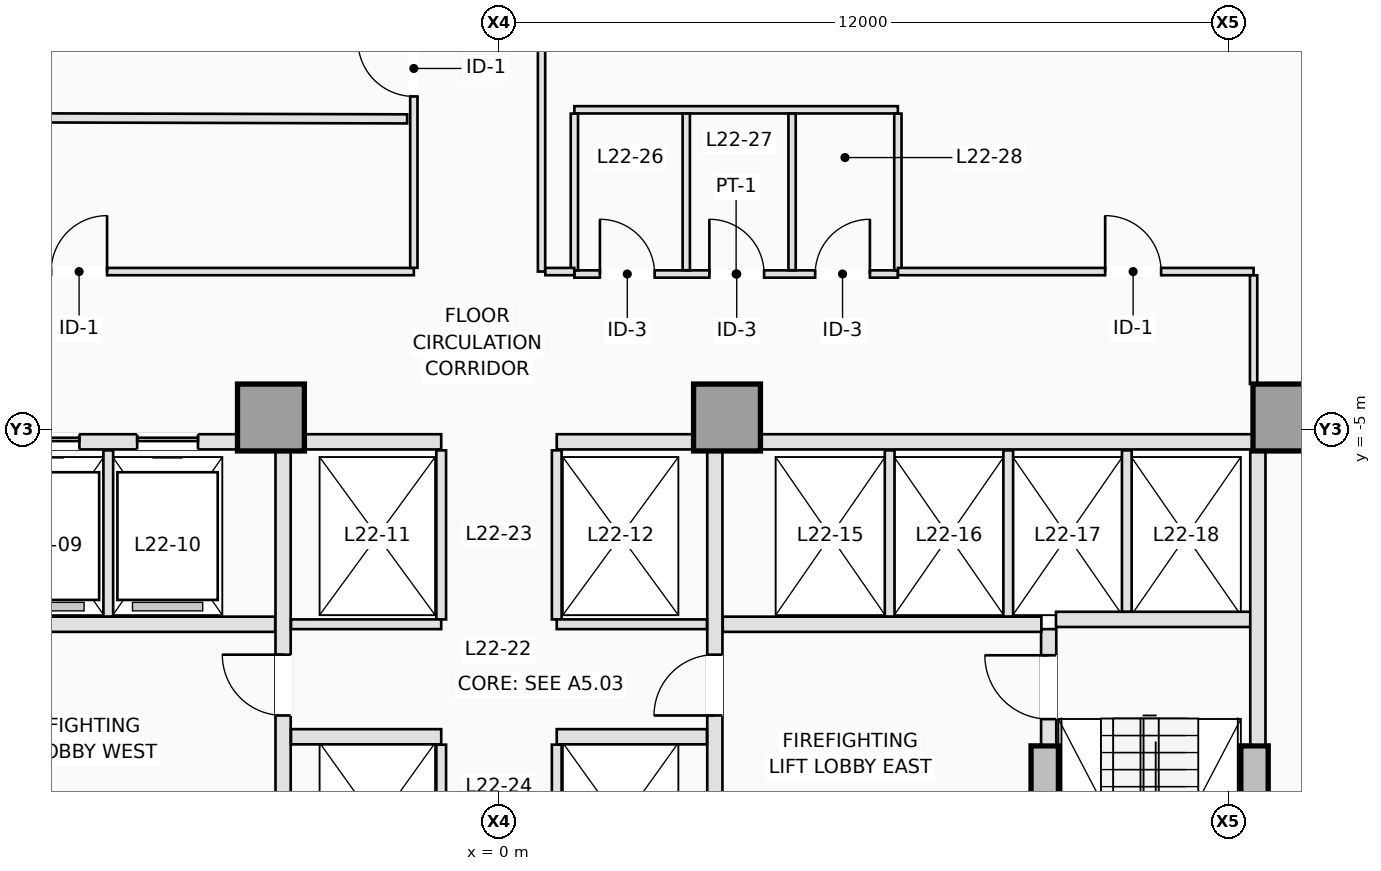
"""IFC4 building model, lengths in metres.
Left out: names, types, materials, properties, quantities, classifications, styles, units other than length and angle.
Written with IfcOpenShell. Run it as: python <this file> out.ifc"""

import sys

from ifc_helpers import new_model, si_unit, direction, frame, frame_2d, origin, origin_2d, place, context, subcontext, project, spatial, rectangle, extrude, element, fill, save


model = new_model("IFC4")
c1 = context("Model", 3, precision=1e-05, world=origin(), true_north=direction((0.0, 1.0)))
c2 = subcontext(c1, "Body", "Model", "MODEL_VIEW")
j1 = project(units=[si_unit("LENGTHUNIT", "METRE"), si_unit("PLANEANGLEUNIT", "RADIAN")], contexts=[c1])
p1 = place(None, origin())
s1 = spatial("IfcSite", under=j1, at=p1, CompositionType="ELEMENT")
p2 = place(p1, origin())
s2 = spatial("IfcBuilding", under=s1, at=p2, CompositionType="ELEMENT")
p3 = place(p2, frame((0.0, 0.0, 83.6)))
s3 = spatial("IfcBuildingStorey", under=s2, at=p3, CompositionType="ELEMENT", Elevation=83.6)
p4 = place(p3, frame((12.425, -15.725, 0.0), z_axis=(0.0, 0.0, 1.0), x_axis=(0.0, 1.0, 0.0)))
e1 = element("IfcWall", 1, at=p4, inside=s3, PredefinedType="SHEAR", context=c2, shape_type="SweptSolid", body=[
    extrude(rectangle(XDim=5.525, YDim=0.45, at=frame_2d((2.763, 0.0))), origin(), (0.0, 0.0, 1.0), 3.5),
])
p5 = place(p3, frame((8.975, -16.15, 0.0), z_axis=(0.0, 0.0, 1.0), x_axis=(0.0, 1.0, 0.0)))
e2 = element("IfcWall", 2, at=p5, inside=s3, PredefinedType="SHEAR", context=c2, shape_type="SweptSolid", body=[
    extrude(rectangle(XDim=5.95, YDim=0.45, at=frame_2d((2.975, 0.0))), origin(), (0.0, 0.0, 1.0), 3.5),
])
for number, where, z_axis, x_axis in (
    (3, (-3.75, -4.8, 0.0), (0.0, 0.0, 1.0), (1.0, 0.0, 0.0)),
    (4, (3.75, -4.8, 0.0), (0.0, 0.0, 1.0), (1.0, 0.0, 0.0)),
    (5, (12.95, -4.8, 0.0), (0.0, 0.0, 1.0), (1.0, 0.0, 0.0)),
):
    element("IfcColumn", number, at=place(p3, frame(where, z_axis=z_axis, x_axis=x_axis)), inside=s3, PredefinedType="COLUMN", context=c2, shape_type="SweptSolid", body=[
        extrude(rectangle(XDim=1.1, YDim=1.1, at=origin_2d()), origin(), (0.0, 0.0, 1.0), 3.5),
    ])
p6 = place(p3, frame((9.04, -10.18, 0.0), z_axis=(0.0, 0.0, 1.0), x_axis=(0.0, 1.0, 0.0)))
e6 = element("IfcWall", 6, at=p6, inside=s3, PredefinedType="PARTITIONING", context=c2, shape_type="SweptSolid", body=[
    extrude(rectangle(XDim=1.9, YDim=0.25, at=frame_2d((0.95, 0.0))), origin(), (0.0, 0.0, 1.0), 3.25),
])
p7 = place(p6, frame((0.42, 0.0, 0.0)))
e7 = element("IfcOpeningElement", 7, at=p7, cuts=e6, PredefinedType="OPENING", context=c2, shape_type="SweptSolid", body=[
    extrude(rectangle(XDim=1.05, YDim=2.15, at=frame_2d((0.525, 1.075))), frame((0.0, 0.135, 0.0), z_axis=(0.0, -1.0, 0.0), x_axis=(1.0, 0.0, 0.0)), (0.0, 0.0, 1.0), 0.27),
])
p8 = place(p3, frame((9.16, -8.12, 0.0), z_axis=(0.0, 0.0, 1.0), x_axis=(1.0, 0.0, 0.0)))
e8 = element("IfcWall", 8, at=p8, inside=s3, PredefinedType="PARTITIONING", context=c2, shape_type="SweptSolid", body=[
    extrude(rectangle(XDim=3.22, YDim=0.25, at=frame_2d((1.61, 0.0))), origin(), (0.0, 0.0, 1.0), 3.25),
])
p9 = place(p3, frame((12.48, -10.18, 0.0), z_axis=(0.0, 0.0, 1.0), x_axis=(0.0, 1.0, 0.0)))
e9 = element("IfcWall", 9, at=p9, inside=s3, PredefinedType="PARTITIONING", context=c2, shape_type="SweptSolid", body=[
    extrude(rectangle(XDim=4.828, YDim=0.25, at=frame_2d((2.414, 0.0))), origin(), (0.0, 0.0, 1.0), 3.25),
])
for number, where, z_axis, x_axis in (
    (10, (-8.92, -8.2, 0.0), (0.0, 0.0, 1.0), (1.0, 0.0, 0.0)),
    (11, (3.68, -8.2, 0.0), (0.0, 0.0, 1.0), (1.0, 0.0, 0.0)),
):
    element("IfcWall", number, at=place(p3, frame(where, z_axis=z_axis, x_axis=x_axis)), inside=s3, PredefinedType="PARTITIONING", context=c2, shape_type="SweptSolid", body=[
        extrude(rectangle(XDim=5.24, YDim=0.25, at=frame_2d((2.62, 0.0))), origin(), (0.0, 0.0, 1.0), 3.25),
    ])
p10 = place(p3, frame((-3.55, -15.798, 0.0), z_axis=(0.0, 0.0, 1.0), x_axis=(0.0, 1.0, 0.0)))
e12 = element("IfcWall", 12, at=p10, inside=s3, PredefinedType="PARTITIONING", context=c2, shape_type="SweptSolid", body=[
    extrude(rectangle(XDim=10.446, YDim=0.25, at=frame_2d((5.223, 0.0))), origin(), (0.0, 0.0, 1.0), 3.25),
])
p11 = place(p10, frame((6.098, 0.0, 0.0)))
e13 = element("IfcOpeningElement", 13, at=p11, cuts=e12, PredefinedType="OPENING", context=c2, shape_type="SweptSolid", body=[
    extrude(rectangle(XDim=1.0, YDim=2.15, at=frame_2d((0.5, 1.075))), frame((0.0, 0.135, 0.0), z_axis=(0.0, -1.0, 0.0), x_axis=(1.0, 0.0, 0.0)), (0.0, 0.0, 1.0), 0.27),
])
p12 = place(p3, frame((3.55, -15.798, 0.0), z_axis=(0.0, 0.0, 1.0), x_axis=(0.0, 1.0, 0.0)))
e14 = element("IfcWall", 14, at=p12, inside=s3, PredefinedType="PARTITIONING", context=c2, shape_type="SweptSolid", body=[
    extrude(rectangle(XDim=10.446, YDim=0.25, at=frame_2d((5.223, 0.0))), origin(), (0.0, 0.0, 1.0), 3.25),
])
p13 = place(p12, frame((6.098, 0.0, 0.0)))
e15 = element("IfcOpeningElement", 15, at=p13, cuts=e14, PredefinedType="OPENING", context=c2, shape_type="SweptSolid", body=[
    extrude(rectangle(XDim=1.0, YDim=2.15, at=frame_2d((0.5, 1.075))), frame((0.0, 0.135, 0.0), z_axis=(0.0, -1.0, 0.0), x_axis=(1.0, 0.0, 0.0)), (0.0, 0.0, 1.0), 0.27),
])
p14 = place(p3, frame((-12.398, -5.2, 0.0), z_axis=(0.0, 0.0, 1.0), x_axis=(1.0, 0.0, 0.0)))
e16 = element("IfcWall", 16, at=p14, inside=s3, PredefinedType="PARTITIONING", context=c2, shape_type="SweptSolid", body=[
    extrude(rectangle(XDim=8.096, YDim=0.25, at=frame_2d((4.048, 0.0))), origin(), (0.0, 0.0, 1.0), 3.25),
])
p15 = place(p14, frame((0.598, 0.0, 0.0)))
e17 = element("IfcOpeningElement", 17, at=p15, cuts=e16, PredefinedType="OPENING", context=c2, shape_type="SweptSolid", body=[
    extrude(rectangle(XDim=1.0, YDim=2.15, at=frame_2d((0.5, 1.075))), frame((0.0, 0.135, 0.0), z_axis=(0.0, -1.0, 0.0), x_axis=(1.0, 0.0, 0.0)), (0.0, 0.0, 1.0), 0.27),
])
p16 = place(p14, frame((2.548, 0.0, 0.0)))
e18 = element("IfcOpeningElement", 18, at=p16, cuts=e16, PredefinedType="OPENING", context=c2, shape_type="SweptSolid", body=[
    extrude(rectangle(XDim=1.0, YDim=2.15, at=frame_2d((0.5, 1.075))), frame((0.0, 0.135, 0.0), z_axis=(0.0, -1.0, 0.0), x_axis=(1.0, 0.0, 0.0)), (0.0, 0.0, 1.0), 0.27),
])
p17 = place(p14, frame((4.498, 0.0, 0.0)))
e19 = element("IfcOpeningElement", 19, at=p17, cuts=e16, PredefinedType="OPENING", context=c2, shape_type="SweptSolid", body=[
    extrude(rectangle(XDim=1.0, YDim=2.15, at=frame_2d((0.5, 1.075))), frame((0.0, 0.135, 0.0), z_axis=(0.0, -1.0, 0.0), x_axis=(1.0, 0.0, 0.0)), (0.0, 0.0, 1.0), 0.27),
])
p18 = place(p14, frame((6.448, 0.0, 0.0)))
e20 = element("IfcOpeningElement", 20, at=p18, cuts=e16, PredefinedType="OPENING", context=c2, shape_type="SweptSolid", body=[
    extrude(rectangle(XDim=1.0, YDim=2.15, at=frame_2d((0.5, 1.075))), frame((0.0, 0.135, 0.0), z_axis=(0.0, -1.0, 0.0), x_axis=(1.0, 0.0, 0.0)), (0.0, 0.0, 1.0), 0.27),
])
p19 = place(p3, frame((4.302, -5.2, 0.0), z_axis=(0.0, 0.0, 1.0), x_axis=(1.0, 0.0, 0.0)))
e21 = element("IfcWall", 21, at=p19, inside=s3, PredefinedType="PARTITIONING", context=c2, shape_type="SweptSolid", body=[
    extrude(rectangle(XDim=8.096, YDim=0.25, at=frame_2d((4.048, 0.0))), origin(), (0.0, 0.0, 1.0), 3.25),
])
for number, where, z_axis, x_axis in (
    (22, (-3.198, -5.2, 0.0), (0.0, 0.0, 1.0), (1.0, 0.0, 0.0)),
    (23, (0.95, -5.2, 0.0), (0.0, 0.0, 1.0), (1.0, 0.0, 0.0)),
):
    element("IfcWall", number, at=place(p3, frame(where, z_axis=z_axis, x_axis=x_axis)), inside=s3, PredefinedType="PARTITIONING", context=c2, shape_type="SweptSolid", body=[
        extrude(rectangle(XDim=2.248, YDim=0.25, at=frame_2d((1.124, 0.0))), origin(), (0.0, 0.0, 1.0), 3.25),
    ])
for number, where, z_axis, x_axis in (
    (24, (-6.425, -8.073, 0.0), (0.0, 0.0, 1.0), (0.0, 1.0, 0.0)),
    (25, (6.425, -8.073, 0.0), (0.0, 0.0, 1.0), (0.0, 1.0, 0.0)),
    (26, (8.375, -8.073, 0.0), (0.0, 0.0, 1.0), (0.0, 1.0, 0.0)),
):
    element("IfcWall", number, at=place(p3, frame(where, z_axis=z_axis, x_axis=x_axis)), inside=s3, PredefinedType="PARTITIONING", context=c2, shape_type="SweptSolid", body=[
        extrude(rectangle(XDim=2.733, YDim=0.16, at=frame_2d((1.366, 0.0))), origin(), (0.0, 0.0, 1.0), 3.25),
    ])
p20 = place(p3, frame((10.325, -7.993, 0.0), z_axis=(0.0, 0.0, 1.0), x_axis=(0.0, 1.0, 0.0)))
e27 = element("IfcWall", 27, at=p20, inside=s3, PredefinedType="PARTITIONING", context=c2, shape_type="SweptSolid", body=[
    extrude(rectangle(XDim=2.653, YDim=0.16, at=frame_2d((1.326, 0.0))), origin(), (0.0, 0.0, 1.0), 3.25),
])
for number, where, z_axis, x_axis in (
    (28, (-0.95, -8.12, 0.0), (0.0, 0.0, 1.0), (0.0, 1.0, 0.0)),
    (29, (0.95, -8.12, 0.0), (0.0, 0.0, 1.0), (0.0, 1.0, 0.0)),
):
    element("IfcWall", number, at=place(p3, frame(where, z_axis=z_axis, x_axis=x_axis)), inside=s3, PredefinedType="PARTITIONING", context=c2, shape_type="SweptSolid", body=[
        extrude(rectangle(XDim=2.78, YDim=0.16, at=frame_2d((1.39, 0.0))), origin(), (0.0, 0.0, 1.0), 3.25),
    ])
for number, where, z_axis, x_axis in (
    (30, (-3.42, -8.2, 0.0), (0.0, 0.0, 1.0), (1.0, 0.0, 0.0)),
    (31, (0.95, -8.2, 0.0), (0.0, 0.0, 1.0), (1.0, 0.0, 0.0)),
):
    element("IfcWall", number, at=place(p3, frame(where, z_axis=z_axis, x_axis=x_axis)), inside=s3, PredefinedType="PARTITIONING", context=c2, shape_type="SweptSolid", body=[
        extrude(rectangle(XDim=2.47, YDim=0.16, at=frame_2d((1.235, 0.0))), origin(), (0.0, 0.0, 1.0), 3.25),
    ])
for number, where, z_axis, x_axis in (
    (32, (-3.42, -10.05, 0.0), (0.0, 0.0, 1.0), (1.0, 0.0, 0.0)),
    (33, (0.95, -10.05, 0.0), (0.0, 0.0, 1.0), (1.0, 0.0, 0.0)),
):
    element("IfcWall", number, at=place(p3, frame(where, z_axis=z_axis, x_axis=x_axis)), inside=s3, PredefinedType="PARTITIONING", context=c2, shape_type="SweptSolid", body=[
        extrude(rectangle(XDim=2.47, YDim=0.25, at=frame_2d((1.235, 0.0))), origin(), (0.0, 0.0, 1.0), 3.25),
    ])
for number, where, z_axis, x_axis in (
    (34, (-0.95, -12.818, 0.0), (0.0, 0.0, 1.0), (0.0, 1.0, 0.0)),
    (35, (0.95, -12.818, 0.0), (0.0, 0.0, 1.0), (0.0, 1.0, 0.0)),
):
    element("IfcWall", number, at=place(p3, frame(where, z_axis=z_axis, x_axis=x_axis)), inside=s3, PredefinedType="PARTITIONING", context=c2, shape_type="SweptSolid", body=[
        extrude(rectangle(XDim=2.638, YDim=0.16, at=frame_2d((1.319, 0.0))), origin(), (0.0, 0.0, 1.0), 3.25),
    ])
p21 = place(p3, frame((1.24, -2.44, 0.0), z_axis=(0.0, 0.0, 1.0), x_axis=(1.0, 0.0, 0.0)))
e36 = element("IfcWall", 36, at=p21, inside=s3, PredefinedType="PARTITIONING", context=c2, shape_type="SweptSolid", body=[
    extrude(rectangle(XDim=5.32, YDim=0.12, at=frame_2d((2.66, 0.0))), origin(), (0.0, 0.0, 1.0), 3.25),
])
p22 = place(p21, frame((0.42, 0.0, 0.0)))
e37 = element("IfcOpeningElement", 37, at=p22, cuts=e36, PredefinedType="OPENING", context=c2, shape_type="SweptSolid", body=[
    extrude(rectangle(XDim=0.9, YDim=2.12, at=frame_2d((0.45, 1.06))), frame((0.0, 0.07, 0.0), z_axis=(0.0, -1.0, 0.0), x_axis=(1.0, 0.0, 0.0)), (0.0, 0.0, 1.0), 0.14),
])
p23 = place(p21, frame((2.22, 0.0, 0.0)))
e38 = element("IfcOpeningElement", 38, at=p23, cuts=e36, PredefinedType="OPENING", context=c2, shape_type="SweptSolid", body=[
    extrude(rectangle(XDim=0.9, YDim=2.12, at=frame_2d((0.45, 1.06))), frame((0.0, 0.07, 0.0), z_axis=(0.0, -1.0, 0.0), x_axis=(1.0, 0.0, 0.0)), (0.0, 0.0, 1.0), 0.14),
])
p24 = place(p21, frame((3.96, 0.0, 0.0)))
e39 = element("IfcOpeningElement", 39, at=p24, cuts=e36, PredefinedType="OPENING", context=c2, shape_type="SweptSolid", body=[
    extrude(rectangle(XDim=0.9, YDim=2.12, at=frame_2d((0.45, 1.06))), frame((0.0, 0.07, 0.0), z_axis=(0.0, -1.0, 0.0), x_axis=(1.0, 0.0, 0.0)), (0.0, 0.0, 1.0), 0.14),
])
p25 = place(p3, frame((1.24, 0.26, 0.0), z_axis=(0.0, 0.0, 1.0), x_axis=(1.0, 0.0, 0.0)))
e40 = element("IfcWall", 40, at=p25, inside=s3, PredefinedType="PARTITIONING", context=c2, shape_type="SweptSolid", body=[
    extrude(rectangle(XDim=5.32, YDim=0.12, at=frame_2d((2.66, 0.0))), origin(), (0.0, 0.0, 1.0), 2.891),
])
for number, where, z_axis, x_axis in (
    (41, (1.24, -2.378, 0.0), (0.0, 0.0, 1.0), (0.0, 1.0, 0.0)),
    (42, (3.08, -2.378, 0.0), (0.0, 0.0, 1.0), (0.0, 1.0, 0.0)),
    (43, (4.82, -2.378, 0.0), (0.0, 0.0, 1.0), (0.0, 1.0, 0.0)),
    (44, (6.56, -2.378, 0.0), (0.0, 0.0, 1.0), (0.0, 1.0, 0.0)),
):
    element("IfcWall", number, at=place(p3, frame(where, z_axis=z_axis, x_axis=x_axis)), inside=s3, PredefinedType="PARTITIONING", context=c2, shape_type="SweptSolid", body=[
        extrude(rectangle(XDim=2.576, YDim=0.12, at=frame_2d((1.288, 0.0))), origin(), (0.0, 0.0, 1.0), 3.25),
    ])
p26 = place(p3, frame((-12.348, -2.4, 0.0), z_axis=(0.0, 0.0, 1.0), x_axis=(1.0, 0.0, 0.0)))
e45 = element("IfcWall", 45, at=p26, inside=s3, PredefinedType="PARTITIONING", context=c2, shape_type="SweptSolid", body=[
    extrude(rectangle(XDim=10.948, YDim=0.12, at=frame_2d((5.474, 0.0))), origin(), (0.0, 0.0, 1.0), 3.25),
])
p27 = place(p26, frame((4.983, 0.0, 0.0)))
e46 = element("IfcOpeningElement", 46, at=p27, cuts=e45, PredefinedType="OPENING", context=c2, shape_type="SweptSolid", body=[
    extrude(rectangle(XDim=0.92, YDim=2.12, at=frame_2d((0.46, 1.06))), frame((0.0, 0.07, 0.0), z_axis=(0.0, -1.0, 0.0), x_axis=(1.0, 0.0, 0.0)), (0.0, 0.0, 1.0), 0.14),
])
p28 = place(p3, frame((-1.4, -2.338, 0.0), z_axis=(0.0, 0.0, 1.0), x_axis=(0.0, 1.0, 0.0)))
e47 = element("IfcWall", 47, at=p28, inside=s3, PredefinedType="PARTITIONING", context=c2, shape_type="SweptSolid", body=[
    extrude(rectangle(XDim=9.238, YDim=0.12, at=frame_2d((4.619, 0.0))), origin(), (0.0, 0.0, 1.0), 3.25),
])
p29 = place(p28, frame((2.818, 0.0, 0.0)))
e48 = element("IfcOpeningElement", 48, at=p29, cuts=e47, PredefinedType="OPENING", context=c2, shape_type="SweptSolid", body=[
    extrude(rectangle(XDim=0.92, YDim=2.12, at=frame_2d((0.46, 1.06))), frame((0.0, 0.07, 0.0), z_axis=(0.0, -1.0, 0.0), x_axis=(1.0, 0.0, 0.0)), (0.0, 0.0, 1.0), 0.14),
])
p30 = place(p3, frame((0.7, 6.838, 0.0), z_axis=(0.0, 0.0, 1.0), x_axis=(0.0, -1.0, 0.0)))
e49 = element("IfcWall", 49, at=p30, inside=s3, PredefinedType="PARTITIONING", context=c2, shape_type="SweptSolid", body=[
    extrude(rectangle(XDim=9.238, YDim=0.12, at=frame_2d((4.619, 0.0))), origin(), (0.0, 0.0, 1.0), 3.25),
])
p31 = place(p30, frame((3.015, 0.0, 0.0)))
e50 = element("IfcOpeningElement", 50, at=p31, cuts=e49, PredefinedType="OPENING", context=c2, shape_type="SweptSolid", body=[
    extrude(rectangle(XDim=0.92, YDim=2.12, at=frame_2d((0.46, 1.06))), frame((0.0, 0.07, 0.0), z_axis=(0.0, -1.0, 0.0), x_axis=(1.0, 0.0, 0.0)), (0.0, 0.0, 1.0), 0.14),
])
p32 = place(p3, frame((0.762, -2.4, 0.0), z_axis=(0.0, 0.0, 1.0), x_axis=(1.0, 0.0, 0.0)))
e51 = element("IfcWall", 51, at=p32, inside=s3, PredefinedType="PARTITIONING", context=c2, shape_type="SweptSolid", body=[
    extrude(rectangle(XDim=0.476, YDim=0.12, at=frame_2d((0.238, 0.0))), origin(), (0.0, 0.0, 1.0), 3.25),
])
p33 = place(p3, frame((6.562, -2.4, 0.0), z_axis=(0.0, 0.0, 1.0), x_axis=(1.0, 0.0, 0.0)))
e52 = element("IfcWall", 52, at=p33, inside=s3, PredefinedType="PARTITIONING", context=c2, shape_type="SweptSolid", body=[
    extrude(rectangle(XDim=5.848, YDim=0.12, at=frame_2d((2.924, 0.0))), origin(), (0.0, 0.0, 1.0), 3.25),
])
p34 = place(p33, frame((3.407, 0.0, 0.0)))
e53 = element("IfcOpeningElement", 53, at=p34, cuts=e52, PredefinedType="OPENING", context=c2, shape_type="SweptSolid", body=[
    extrude(rectangle(XDim=0.92, YDim=2.12, at=frame_2d((0.46, 1.06))), frame((0.0, 0.07, 0.0), z_axis=(0.0, -1.0, 0.0), x_axis=(1.0, 0.0, 0.0)), (0.0, 0.0, 1.0), 0.14),
])
p35 = place(p3, frame((12.41, -2.462, 0.0), z_axis=(0.0, 0.0, 1.0), x_axis=(0.0, -1.0, 0.0)))
e54 = element("IfcWall", 54, at=p35, inside=s3, PredefinedType="PARTITIONING", context=c2, shape_type="SweptSolid", body=[
    extrude(rectangle(XDim=1.786, YDim=0.12, at=frame_2d((0.893, 0.0))), origin(), (0.0, 0.0, 1.0), 3.25),
])
p36 = place(p3, frame((-1.51, 0.111, 0.0), z_axis=(0.0, 0.0, 1.0), x_axis=(-0.999996640394, 0.002592142258, 0.0)))
e55 = element("IfcWall", 55, at=p36, inside=s3, PredefinedType="PARTITIONING", context=c2, shape_type="SweptSolid", body=[
    extrude(rectangle(XDim=14.128, YDim=0.15, at=frame_2d((7.064, 0.0))), origin(), (0.0, 0.0, 1.0), 2.891),
])
p37 = place(p17, origin())
e56 = element("IfcDoor", 56, at=p37, inside=s3, OperationType="SLIDING_TO_LEFT", PredefinedType="DOOR", context=c2, shape_type="SweptSolid", body=[
    extrude(rectangle(XDim=1.0, YDim=2.15, at=frame_2d((0.5, 1.075))), frame((0.0, 0.025, 0.0), z_axis=(0.0, -1.0, 0.0), x_axis=(1.0, 0.0, 0.0)), (0.0, 0.0, 1.0), 0.05),
])
fill(e19, e56)
p38 = place(p18, origin())
e57 = element("IfcDoor", 57, at=p38, inside=s3, OperationType="SLIDING_TO_LEFT", PredefinedType="DOOR", context=c2, shape_type="SweptSolid", body=[
    extrude(rectangle(XDim=1.0, YDim=2.15, at=frame_2d((0.5, 1.075))), frame((0.0, 0.025, 0.0), z_axis=(0.0, -1.0, 0.0), x_axis=(1.0, 0.0, 0.0)), (0.0, 0.0, 1.0), 0.05),
])
fill(e20, e57)
p39 = place(p7, origin())
e58 = element("IfcDoor", 58, at=p39, inside=s3, OperationType="SINGLE_SWING_RIGHT", PredefinedType="DOOR", context=c2, shape_type="SweptSolid", body=[
    extrude(rectangle(XDim=1.05, YDim=2.15, at=frame_2d((0.525, 1.075))), frame((0.0, 0.025, 0.0), z_axis=(0.0, -1.0, 0.0), x_axis=(1.0, 0.0, 0.0)), (0.0, 0.0, 1.0), 0.05),
])
fill(e7, e58)
p40 = place(p11, origin())
e59 = element("IfcDoor", 59, at=p40, inside=s3, OperationType="SINGLE_SWING_RIGHT", PredefinedType="DOOR", context=c2, shape_type="SweptSolid", body=[
    extrude(rectangle(XDim=1.0, YDim=2.15, at=frame_2d((0.5, 1.075))), frame((0.0, 0.025, 0.0), z_axis=(0.0, -1.0, 0.0), x_axis=(1.0, 0.0, 0.0)), (0.0, 0.0, 1.0), 0.05),
])
fill(e13, e59)
p41 = place(p13, origin())
e60 = element("IfcDoor", 60, at=p41, inside=s3, OperationType="SINGLE_SWING_LEFT", PredefinedType="DOOR", context=c2, shape_type="SweptSolid", body=[
    extrude(rectangle(XDim=1.0, YDim=2.15, at=frame_2d((0.5, 1.075))), frame((0.0, 0.025, 0.0), z_axis=(0.0, -1.0, 0.0), x_axis=(1.0, 0.0, 0.0)), (0.0, 0.0, 1.0), 0.05),
])
fill(e15, e60)
p42 = place(p22, origin())
e61 = element("IfcDoor", 61, at=p42, inside=s3, OperationType="SINGLE_SWING_LEFT", PredefinedType="DOOR", context=c2, shape_type="SweptSolid", body=[
    extrude(rectangle(XDim=0.9, YDim=2.12, at=frame_2d((0.45, 1.06))), frame((0.0, 0.025, 0.0), z_axis=(0.0, -1.0, 0.0), x_axis=(1.0, 0.0, 0.0)), (0.0, 0.0, 1.0), 0.05),
])
fill(e37, e61)
p43 = place(p23, origin())
e62 = element("IfcDoor", 62, at=p43, inside=s3, OperationType="SINGLE_SWING_LEFT", PredefinedType="DOOR", context=c2, shape_type="SweptSolid", body=[
    extrude(rectangle(XDim=0.9, YDim=2.12, at=frame_2d((0.45, 1.06))), frame((0.0, 0.025, 0.0), z_axis=(0.0, -1.0, 0.0), x_axis=(1.0, 0.0, 0.0)), (0.0, 0.0, 1.0), 0.05),
])
fill(e38, e62)
p44 = place(p24, origin())
e63 = element("IfcDoor", 63, at=p44, inside=s3, OperationType="SINGLE_SWING_RIGHT", PredefinedType="DOOR", context=c2, shape_type="SweptSolid", body=[
    extrude(rectangle(XDim=0.9, YDim=2.12, at=frame_2d((0.45, 1.06))), frame((0.0, 0.025, 0.0), z_axis=(0.0, -1.0, 0.0), x_axis=(1.0, 0.0, 0.0)), (0.0, 0.0, 1.0), 0.05),
])
fill(e39, e63)
p45 = place(p29, origin())
e64 = element("IfcDoor", 64, at=p45, inside=s3, OperationType="SINGLE_SWING_RIGHT", PredefinedType="DOOR", context=c2, shape_type="SweptSolid", body=[
    extrude(rectangle(XDim=0.92, YDim=2.12, at=frame_2d((0.46, 1.06))), frame((0.0, 0.025, 0.0), z_axis=(0.0, -1.0, 0.0), x_axis=(1.0, 0.0, 0.0)), (0.0, 0.0, 1.0), 0.05),
])
fill(e48, e64)
p46 = place(p34, origin())
e65 = element("IfcDoor", 65, at=p46, inside=s3, OperationType="SINGLE_SWING_LEFT", PredefinedType="DOOR", context=c2, shape_type="SweptSolid", body=[
    extrude(rectangle(XDim=0.92, YDim=2.12, at=frame_2d((0.46, 1.06))), frame((0.0, 0.025, 0.0), z_axis=(0.0, -1.0, 0.0), x_axis=(1.0, 0.0, 0.0)), (0.0, 0.0, 1.0), 0.05),
])
fill(e53, e65)
p47 = place(p27, origin())
e66 = element("IfcDoor", 66, at=p47, inside=s3, OperationType="SINGLE_SWING_RIGHT", PredefinedType="DOOR", context=c2, shape_type="SweptSolid", body=[
    extrude(rectangle(XDim=0.92, YDim=2.12, at=frame_2d((0.46, 1.06))), frame((0.0, 0.025, 0.0), z_axis=(0.0, -1.0, 0.0), x_axis=(1.0, 0.0, 0.0)), (0.0, 0.0, 1.0), 0.05),
])
fill(e46, e66)
save(model, sys.argv[1])
